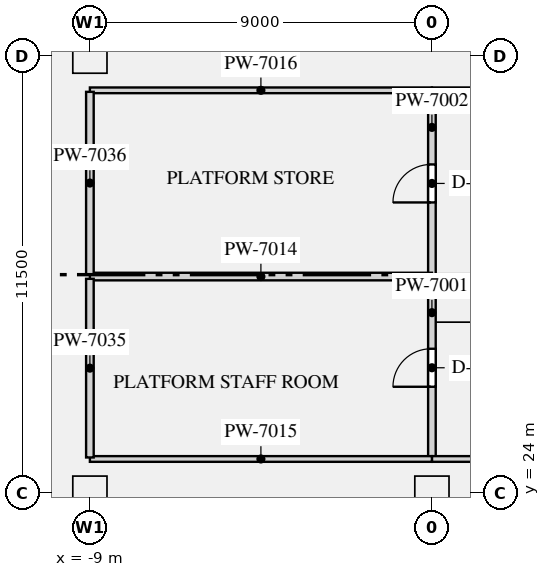
"""IFC4 building model, lengths in metres.
Left out: names, types, materials, properties, quantities, classifications, styles, units other than length and angle.
Written with IfcOpenShell. Run it as: python <this file> out.ifc"""

import sys

from ifc_helpers import new_model, si_unit, direction, frame, frame_2d, origin, origin_2d, place, context, subcontext, project, spatial, rectangle, extrude, element, fill, save


model = new_model("IFC4")
c1 = context("Model", 3, precision=1e-05, world=origin(), true_north=direction((0.0, 1.0)))
c2 = subcontext(c1, "Body", "Model", "MODEL_VIEW")
j1 = project(units=[si_unit("LENGTHUNIT", "METRE"), si_unit("PLANEANGLEUNIT", "RADIAN")], contexts=[c1])
p1 = place(None, origin())
s1 = spatial("IfcSite", under=j1, at=p1, CompositionType="ELEMENT")
p2 = place(p1, origin())
s2 = spatial("IfcBuilding", under=s1, at=p2, CompositionType="ELEMENT")
p3 = place(p2, frame((0.0, 0.0, -6.0)))
s3 = spatial("IfcBuildingStorey", under=s2, at=p3, CompositionType="ELEMENT", Elevation=-6.0)
p4 = place(p3, frame((0.7, 28.95, -0.5), z_axis=(0.0, 0.0, 1.0), x_axis=(1.0, 0.0, 0.0)))
e1 = element("IfcColumn", 1, at=p4, inside=s3, PredefinedType="USERDEFINED", context=c2, shape_type="SweptSolid", body=[
    extrude(rectangle(XDim=1.4, YDim=0.9, at=origin_2d()), origin(), (0.0, 0.0, 1.0), 6.5),
])
for number, where, z_axis, x_axis in (
    (2, (-9.0, 24.0, -0.5), (0.0, 0.0, 1.0), (1.0, 0.0, 0.0)),
    (3, (-9.0, 35.5, -0.5), (0.0, 0.0, 1.0), (1.0, 0.0, 0.0)),
    (4, (0.0, 24.0, -0.5), (0.0, 0.0, 1.0), (1.0, 0.0, 0.0)),
):
    element("IfcColumn", number, at=place(p3, frame(where, z_axis=z_axis, x_axis=x_axis)), inside=s3, PredefinedType="COLUMN", context=c2, shape_type="SweptSolid", body=[
        extrude(rectangle(XDim=0.9, YDim=0.9, at=origin_2d()), origin(), (0.0, 0.0, 1.0), 6.5),
    ])
p5 = place(p3, frame((0.0, 24.9, 0.0), z_axis=(0.0, 0.0, 1.0), x_axis=(0.0, 1.0, 0.0)))
e5 = element("IfcWall", 5, at=p5, inside=s3, PredefinedType="PARTITIONING", context=c2, shape_type="SweptSolid", body=[
    extrude(rectangle(XDim=4.8, YDim=0.2, at=frame_2d((2.4, 0.0))), origin(), (0.0, 0.0, 1.0), 5.598),
])
p6 = place(p5, frame((1.9, 0.0, 0.0)))
e6 = element("IfcOpeningElement", 6, at=p6, cuts=e5, PredefinedType="OPENING", context=c2, shape_type="SweptSolid", body=[
    extrude(rectangle(XDim=1.0, YDim=2.1, at=frame_2d((0.5, 1.05))), frame((0.0, 0.11, 0.0), z_axis=(0.0, -1.0, 0.0), x_axis=(1.0, 0.0, 0.0)), (0.0, 0.0, 1.0), 0.22),
])
p7 = place(p3, frame((0.0, 29.7, 0.0), z_axis=(0.0, 0.0, 1.0), x_axis=(0.0, 1.0, 0.0)))
e7 = element("IfcWall", 7, at=p7, inside=s3, PredefinedType="PARTITIONING", context=c2, shape_type="SweptSolid", body=[
    extrude(rectangle(XDim=4.9, YDim=0.2, at=frame_2d((2.45, 0.0))), origin(), (0.0, 0.0, 1.0), 5.598),
])
p8 = place(p7, frame((1.95, 0.0, 0.0)))
e8 = element("IfcOpeningElement", 8, at=p8, cuts=e7, PredefinedType="OPENING", context=c2, shape_type="SweptSolid", body=[
    extrude(rectangle(XDim=1.0, YDim=2.1, at=frame_2d((0.5, 1.05))), frame((0.0, 0.11, 0.0), z_axis=(0.0, -1.0, 0.0), x_axis=(1.0, 0.0, 0.0)), (0.0, 0.0, 1.0), 0.22),
])
p9 = place(p3, frame((0.0, 24.9, 0.0), z_axis=(0.0, 0.0, 1.0), x_axis=(1.0, 0.0, 0.0)))
e9 = element("IfcWall", 9, at=p9, inside=s3, PredefinedType="PARTITIONING", context=c2, shape_type="SweptSolid", body=[
    extrude(rectangle(XDim=90.0, YDim=0.15, at=frame_2d((45.0, 0.0))), origin(), (0.0, 0.0, 1.0), 5.598),
])
p10 = place(p9, frame((21.6, 0.0, 0.0)))
e10 = element("IfcOpeningElement", 10, at=p10, cuts=e9, PredefinedType="OPENING", context=c2, shape_type="SweptSolid", body=[
    extrude(rectangle(XDim=1.8, YDim=2.4, at=frame_2d((0.9, 1.2))), frame((0.0, 0.085, 0.0), z_axis=(0.0, -1.0, 0.0), x_axis=(1.0, 0.0, 0.0)), (0.0, 0.0, 1.0), 0.17),
])
p11 = place(p3, frame((0.0, 34.6, 0.0), z_axis=(0.0, 0.0, 1.0), x_axis=(1.0, 0.0, 0.0)))
e11 = element("IfcWall", 11, at=p11, inside=s3, PredefinedType="PARTITIONING", context=c2, shape_type="SweptSolid", body=[
    extrude(rectangle(XDim=60.455, YDim=0.15, at=frame_2d((30.228, 0.0))), origin(), (0.0, 0.0, 1.0), 5.598),
])
p12 = place(p11, frame((21.6, 0.0, 0.0)))
e12 = element("IfcOpeningElement", 12, at=p12, cuts=e11, PredefinedType="OPENING", context=c2, shape_type="SweptSolid", body=[
    extrude(rectangle(XDim=1.8, YDim=2.4, at=frame_2d((0.9, 1.2))), frame((0.0, 0.085, 0.0), z_axis=(0.0, -1.0, 0.0), x_axis=(1.0, 0.0, 0.0)), (0.0, 0.0, 1.0), 0.17),
])
p13 = place(p3, frame((-9.0, 29.7, 0.0), z_axis=(0.0, 0.0, 1.0), x_axis=(1.0, 0.0, 0.0)))
e13 = element("IfcWall", 13, at=p13, inside=s3, PredefinedType="PARTITIONING", context=c2, shape_type="SweptSolid", body=[
    extrude(rectangle(XDim=9.0, YDim=0.2, at=frame_2d((4.5, 0.0))), origin(), (0.0, 0.0, 1.0), 5.598),
])
for number, where, z_axis, x_axis in (
    (14, (-9.0, 24.9, 0.0), (0.0, 0.0, 1.0), (1.0, 0.0, 0.0)),
    (15, (-9.0, 34.6, 0.0), (0.0, 0.0, 1.0), (1.0, 0.0, 0.0)),
):
    element("IfcWall", number, at=place(p3, frame(where, z_axis=z_axis, x_axis=x_axis)), inside=s3, PredefinedType="PARTITIONING", context=c2, shape_type="SweptSolid", body=[
        extrude(rectangle(XDim=9.0, YDim=0.15, at=frame_2d((4.5, 0.0))), origin(), (0.0, 0.0, 1.0), 5.598),
    ])
p14 = place(p3, frame((-9.0, 24.94, 0.0), z_axis=(0.0, 0.0, 1.0), x_axis=(0.0, 1.0, 0.0)))
e16 = element("IfcWall", 16, at=p14, inside=s3, PredefinedType="PARTITIONING", context=c2, shape_type="SweptSolid", body=[
    extrude(rectangle(XDim=4.7, YDim=0.2, at=frame_2d((2.35, 0.0))), origin(), (0.0, 0.0, 1.0), 5.598),
])
p15 = place(p3, frame((-9.0, 29.76, 0.0), z_axis=(0.0, 0.0, 1.0), x_axis=(0.0, 1.0, 0.0)))
e17 = element("IfcWall", 17, at=p15, inside=s3, PredefinedType="PARTITIONING", context=c2, shape_type="SweptSolid", body=[
    extrude(rectangle(XDim=4.8, YDim=0.2, at=frame_2d((2.4, 0.0))), origin(), (0.0, 0.0, 1.0), 5.598),
])
p16 = place(p6, origin())
e18 = element("IfcDoor", 18, at=p16, inside=s3, OperationType="SINGLE_SWING_LEFT", PredefinedType="DOOR", context=c2, shape_type="SweptSolid", body=[
    extrude(rectangle(XDim=1.0, YDim=2.1, at=frame_2d((0.5, 1.05))), frame((0.0, 0.025, 0.0), z_axis=(0.0, -1.0, 0.0), x_axis=(1.0, 0.0, 0.0)), (0.0, 0.0, 1.0), 0.05),
])
fill(e6, e18)
p17 = place(p8, origin())
e19 = element("IfcDoor", 19, at=p17, inside=s3, OperationType="SINGLE_SWING_LEFT", PredefinedType="DOOR", context=c2, shape_type="SweptSolid", body=[
    extrude(rectangle(XDim=1.0, YDim=2.1, at=frame_2d((0.5, 1.05))), frame((0.0, 0.025, 0.0), z_axis=(0.0, -1.0, 0.0), x_axis=(1.0, 0.0, 0.0)), (0.0, 0.0, 1.0), 0.05),
])
fill(e8, e19)
save(model, sys.argv[1])
